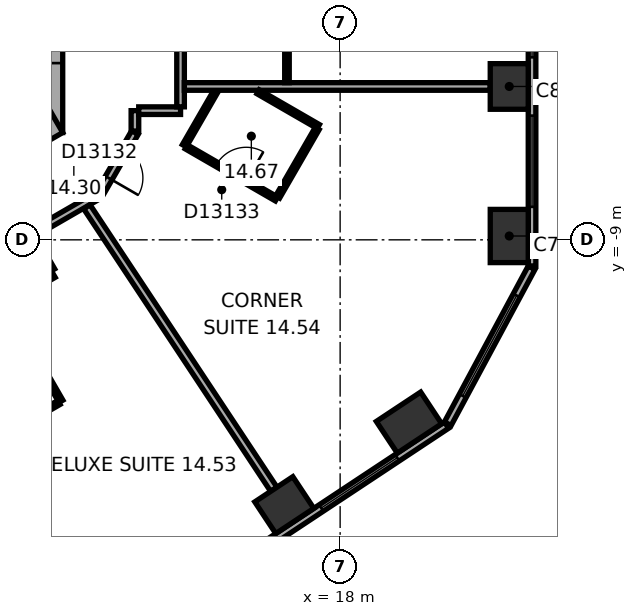
"""IFC4 building model, lengths in metres.
Left out: names, types, materials, properties, quantities, classifications, styles, units other than length and angle.
Written with IfcOpenShell. Run it as: python <this file> out.ifc"""

import sys

from ifc_helpers import new_model, si_unit, direction, frame, frame_2d, origin, origin_2d, place, context, subcontext, project, spatial, rectangle, extrude, element, fill, save


model = new_model("IFC4")
c1 = context("Model", 3, precision=1e-05, world=origin(), true_north=direction((0.0, 1.0)))
c2 = subcontext(c1, "Body", "Model", "MODEL_VIEW")
j1 = project(units=[si_unit("LENGTHUNIT", "METRE"), si_unit("PLANEANGLEUNIT", "RADIAN")], contexts=[c1])
p1 = place(None, origin())
s1 = spatial("IfcSite", under=j1, at=p1, CompositionType="ELEMENT")
p2 = place(p1, origin())
s2 = spatial("IfcBuilding", under=s1, at=p2, CompositionType="ELEMENT")
p3 = place(p2, frame((0.0, 0.0, 67.1)))
s3 = spatial("IfcBuildingStorey", under=s2, at=p3, CompositionType="ELEMENT", Elevation=67.1)
p4 = place(p3, frame((22.45, -8.899, 0.0), z_axis=(0.0, 0.0, 1.0), x_axis=(0.0, 1.0, 0.0)))
e1 = element("IfcColumn", 1, at=p4, inside=s3, PredefinedType="COLUMN", context=c2, shape_type="SweptSolid", body=[
    extrude(rectangle(XDim=1.4, YDim=1.0, at=origin_2d()), origin(), (0.0, 0.0, 1.0), 3.3),
])
for number, where, z_axis, x_axis in (
    (2, (22.45, -4.965, 0.0), (0.0, 0.0, 1.0), (0.0, 1.0, 0.0)),
    (3, (16.531, -15.981, 0.0), (0.0, 0.0, 1.0), (0.834, 0.552, 0.0)),
):
    element("IfcColumn", number, at=place(p3, frame(where, z_axis=z_axis, x_axis=x_axis)), inside=s3, PredefinedType="COLUMN", context=c2, shape_type="SweptSolid", body=[
        extrude(rectangle(XDim=1.2, YDim=1.0, at=origin_2d()), origin(), (0.0, 0.0, 1.0), 3.3),
    ])
p5 = place(p3, frame((19.812, -13.809, 0.0), z_axis=(0.0, 0.0, 1.0), x_axis=(0.833885822067, 0.551936985312, 0.0)))
e4 = element("IfcColumn", 4, at=p5, inside=s3, PredefinedType="COLUMN", context=c2, shape_type="SweptSolid", body=[
    extrude(rectangle(XDim=1.4, YDim=1.0, at=origin_2d()), origin(), (0.0, 0.0, 1.0), 3.3),
])
p6 = place(p3, frame((10.1, -6.177, 0.0), z_axis=(0.0, 0.0, 1.0), x_axis=(0.0, 1.0, 0.0)))
e5 = element("IfcWall", 5, at=p6, inside=s3, PredefinedType="SHEAR", context=c2, shape_type="SweptSolid", body=[
    extrude(rectangle(XDim=12.355, YDim=1.2, at=frame_2d((6.177, 0.0))), origin(), (0.0, 0.0, 1.0), 3.3),
])
p7 = place(p6, frame((6.378, 0.0, 0.0)))
e6 = element("IfcOpeningElement", 6, at=p7, cuts=e5, PredefinedType="OPENING", context=c2, shape_type="SweptSolid", body=[
    extrude(rectangle(XDim=1.5, YDim=2.1, at=frame_2d((0.75, 1.05))), frame((0.0, 0.61, 0.0), z_axis=(0.0, -1.0, 0.0), x_axis=(1.0, 0.0, 0.0)), (0.0, 0.0, 1.0), 1.22),
])
p8 = place(p6, frame((1.828, 0.0, 0.0)))
e7 = element("IfcOpeningElement", 7, at=p8, cuts=e5, PredefinedType="OPENING", context=c2, shape_type="SweptSolid", body=[
    extrude(rectangle(XDim=1.1, YDim=2.1, at=frame_2d((0.55, 1.05))), frame((0.0, 0.61, 0.0), z_axis=(0.0, -1.0, 0.0), x_axis=(1.0, 0.0, 0.0)), (0.0, 0.0, 1.0), 1.22),
])
p9 = place(p6, frame((4.427, 0.0, 0.0)))
e8 = element("IfcOpeningElement", 8, at=p9, cuts=e5, PredefinedType="OPENING", context=c2, shape_type="SweptSolid", body=[
    extrude(rectangle(XDim=1.1, YDim=2.1, at=frame_2d((0.55, 1.05))), frame((0.0, 0.61, 0.0), z_axis=(0.0, -1.0, 0.0), x_axis=(1.0, 0.0, 0.0)), (0.0, 0.0, 1.0), 1.22),
])
p10 = place(p3, frame((-0.3, -11.836, 0.0), z_axis=(0.0, 0.0, 1.0), x_axis=(0.866021384402, 0.500006961711, 0.0)))
e9 = element("IfcWall", 9, at=p10, inside=s3, PredefinedType="SHEAR", context=c2, shape_type="SweptSolid", body=[
    extrude(rectangle(XDim=12.355, YDim=1.2, at=frame_2d((6.178, 0.0))), origin(), (0.0, 0.0, 1.0), 3.3),
])
p11 = place(p10, frame((4.128, 0.0, 0.0)))
e10 = element("IfcOpeningElement", 10, at=p11, cuts=e9, PredefinedType="OPENING", context=c2, shape_type="SweptSolid", body=[
    extrude(rectangle(XDim=0.9, YDim=2.1, at=frame_2d((0.45, 1.05))), frame((0.0, 0.61, 0.0), z_axis=(0.0, -1.0, 0.0), x_axis=(1.0, 0.0, 0.0)), (0.0, 0.0, 1.0), 1.22),
])
p12 = place(p10, frame((7.928, 0.0, 0.0)))
e11 = element("IfcOpeningElement", 11, at=p12, cuts=e9, PredefinedType="OPENING", context=c2, shape_type="SweptSolid", body=[
    extrude(rectangle(XDim=1.1, YDim=2.1, at=frame_2d((0.55, 1.05))), frame((0.0, 0.61, 0.0), z_axis=(0.0, -1.0, 0.0), x_axis=(1.0, 0.0, 0.0)), (0.0, 0.0, 1.0), 1.22),
])
p13 = place(p3, frame((23.05, -9.687, 0.0), z_axis=(0.0, 0.0, 1.0), x_axis=(0.0, 1.0, 0.0)))
e12 = element("IfcWall", 12, at=p13, inside=s3, PredefinedType="STANDARD", context=c2, shape_type="SweptSolid", body=[
    extrude(rectangle(XDim=21.246, YDim=0.2, at=frame_2d((10.623, 0.0))), origin(), (0.0, 0.0, 1.0), 3.3),
])
p14 = place(p13, frame((1.555, 0.0, 0.8)))
e13 = element("IfcOpeningElement", 13, at=p14, cuts=e12, PredefinedType="OPENING", context=c2, shape_type="SweptSolid", body=[
    extrude(rectangle(XDim=2.4, YDim=1.7, at=frame_2d((1.2, 0.85))), frame((0.0, 0.11, 0.0), z_axis=(0.0, -1.0, 0.0), x_axis=(1.0, 0.0, 0.0)), (0.0, 0.0, 1.0), 0.22),
])
p15 = place(p13, frame((5.489, 0.0, 0.8)))
e14 = element("IfcOpeningElement", 14, at=p15, cuts=e12, PredefinedType="OPENING", context=c2, shape_type="SweptSolid", body=[
    extrude(rectangle(XDim=2.4, YDim=1.7, at=frame_2d((1.2, 0.85))), frame((0.0, 0.11, 0.0), z_axis=(0.0, -1.0, 0.0), x_axis=(1.0, 0.0, 0.0)), (0.0, 0.0, 1.0), 0.22),
])
p16 = place(p13, frame((9.424, 0.0, 0.8)))
e15 = element("IfcOpeningElement", 15, at=p16, cuts=e12, PredefinedType="OPENING", context=c2, shape_type="SweptSolid", body=[
    extrude(rectangle(XDim=2.4, YDim=1.7, at=frame_2d((1.2, 0.85))), frame((0.0, 0.11, 0.0), z_axis=(0.0, -1.0, 0.0), x_axis=(1.0, 0.0, 0.0)), (0.0, 0.0, 1.0), 0.22),
])
p17 = place(p13, frame((13.358, 0.0, 0.8)))
e16 = element("IfcOpeningElement", 16, at=p17, cuts=e12, PredefinedType="OPENING", context=c2, shape_type="SweptSolid", body=[
    extrude(rectangle(XDim=2.4, YDim=1.7, at=frame_2d((1.2, 0.85))), frame((0.0, 0.11, 0.0), z_axis=(0.0, -1.0, 0.0), x_axis=(1.0, 0.0, 0.0)), (0.0, 0.0, 1.0), 0.22),
])
p18 = place(p13, frame((17.293, 0.0, 0.8)))
e17 = element("IfcOpeningElement", 17, at=p18, cuts=e12, PredefinedType="OPENING", context=c2, shape_type="SweptSolid", body=[
    extrude(rectangle(XDim=2.4, YDim=1.7, at=frame_2d((1.2, 0.85))), frame((0.0, 0.11, 0.0), z_axis=(0.0, -1.0, 0.0), x_axis=(1.0, 0.0, 0.0)), (0.0, 0.0, 1.0), 0.22),
])
p19 = place(p3, frame((3.083, -25.601, 0.0), z_axis=(0.0, 0.0, 1.0), x_axis=(0.833884295743, 0.551939291329, 0.0)))
e18 = element("IfcWall", 18, at=p19, inside=s3, PredefinedType="STANDARD", context=c2, shape_type="SweptSolid", body=[
    extrude(rectangle(XDim=21.246, YDim=0.2, at=frame_2d((10.623, 0.0))), origin(), (0.0, 0.0, 1.0), 3.3),
])
p20 = place(p19, frame((1.553, 0.0, 0.8)))
e19 = element("IfcOpeningElement", 19, at=p20, cuts=e18, PredefinedType="OPENING", context=c2, shape_type="SweptSolid", body=[
    extrude(rectangle(XDim=2.4, YDim=1.7, at=frame_2d((1.2, 0.85))), frame((0.0, 0.11, 0.0), z_axis=(0.0, -1.0, 0.0), x_axis=(1.0, 0.0, 0.0)), (0.0, 0.0, 1.0), 0.22),
])
p21 = place(p19, frame((5.488, 0.0, 0.8)))
e20 = element("IfcOpeningElement", 20, at=p21, cuts=e18, PredefinedType="OPENING", context=c2, shape_type="SweptSolid", body=[
    extrude(rectangle(XDim=2.4, YDim=1.7, at=frame_2d((1.2, 0.85))), frame((0.0, 0.11, 0.0), z_axis=(0.0, -1.0, 0.0), x_axis=(1.0, 0.0, 0.0)), (0.0, 0.0, 1.0), 0.22),
])
p22 = place(p19, frame((9.422, 0.0, 0.8)))
e21 = element("IfcOpeningElement", 21, at=p22, cuts=e18, PredefinedType="OPENING", context=c2, shape_type="SweptSolid", body=[
    extrude(rectangle(XDim=2.4, YDim=1.7, at=frame_2d((1.2, 0.85))), frame((0.0, 0.11, 0.0), z_axis=(0.0, -1.0, 0.0), x_axis=(1.0, 0.0, 0.0)), (0.0, 0.0, 1.0), 0.22),
])
p23 = place(p19, frame((13.357, 0.0, 0.8)))
e22 = element("IfcOpeningElement", 22, at=p23, cuts=e18, PredefinedType="OPENING", context=c2, shape_type="SweptSolid", body=[
    extrude(rectangle(XDim=2.4, YDim=1.7, at=frame_2d((1.2, 0.85))), frame((0.0, 0.11, 0.0), z_axis=(0.0, -1.0, 0.0), x_axis=(1.0, 0.0, 0.0)), (0.0, 0.0, 1.0), 0.22),
])
p24 = place(p19, frame((17.291, 0.0, 0.8)))
e23 = element("IfcOpeningElement", 23, at=p24, cuts=e18, PredefinedType="OPENING", context=c2, shape_type="SweptSolid", body=[
    extrude(rectangle(XDim=2.4, YDim=1.7, at=frame_2d((1.2, 0.85))), frame((0.0, 0.11, 0.0), z_axis=(0.0, -1.0, 0.0), x_axis=(1.0, 0.0, 0.0)), (0.0, 0.0, 1.0), 0.22),
])
p25 = place(p3, frame((20.833, -13.839, 0.0), z_axis=(0.0, 0.0, 1.0), x_axis=(0.473321668581, 0.880889662813, 0.0)))
e24 = element("IfcWall", 24, at=p25, inside=s3, PredefinedType="STANDARD", context=c2, shape_type="SweptSolid", body=[
    extrude(rectangle(XDim=4.66, YDim=0.2, at=frame_2d((2.33, 0.0))), origin(), (0.0, 0.0, 1.0), 3.3),
])
p26 = place(p25, frame((0.83, 0.0, 0.8)))
e25 = element("IfcOpeningElement", 25, at=p26, cuts=e24, PredefinedType="OPENING", context=c2, shape_type="SweptSolid", body=[
    extrude(rectangle(XDim=3.0, YDim=1.7, at=frame_2d((1.5, 0.85))), frame((0.0, 0.11, 0.0), z_axis=(0.0, -1.0, 0.0), x_axis=(1.0, 0.0, 0.0)), (0.0, 0.0, 1.0), 0.22),
])
p27 = place(p3, frame((7.385, -11.673, 0.0), z_axis=(0.0, 0.0, 1.0), x_axis=(0.866037524642, 0.499979005472, 0.0)))
e26 = element("IfcWall", 26, at=p27, inside=s3, PredefinedType="PARTITIONING", context=c2, shape_type="SweptSolid", body=[
    extrude(rectangle(XDim=3.542, YDim=0.2, at=frame_2d((1.771, 0.0))), origin(), (0.0, 0.0, 1.0), 3.05),
])
p28 = place(p3, frame((9.203, -10.738, 0.0), z_axis=(0.0, 0.0, 1.0), x_axis=(0.50005036918, -0.865996321171, 0.0)))
e27 = element("IfcWall", 27, at=p28, inside=s3, PredefinedType="PARTITIONING", context=c2, shape_type="SweptSolid", body=[
    extrude(rectangle(XDim=2.9, YDim=0.12, at=frame_2d((1.45, 0.0))), origin(), (0.0, 0.0, 1.0), 3.05),
])
p29 = place(p3, frame((9.852, -8.861, 0.0), z_axis=(0.0, 0.0, 1.0), x_axis=(0.866013291437, 0.500020978615, 0.0)))
e28 = element("IfcWall", 28, at=p29, inside=s3, PredefinedType="PARTITIONING", context=c2, shape_type="SweptSolid", body=[
    extrude(rectangle(XDim=2.077, YDim=0.2, at=frame_2d((1.038, 0.0))), origin(), (0.0, 0.0, 1.0), 3.05),
])
p30 = place(p3, frame((10.402, -9.815, 0.0), z_axis=(0.0, 0.0, 1.0), x_axis=(-0.499968756647, 0.866043441391, 0.0)))
e29 = element("IfcWall", 29, at=p30, inside=s3, PredefinedType="PARTITIONING", context=c2, shape_type="SweptSolid", body=[
    extrude(rectangle(XDim=1.001, YDim=0.2, at=frame_2d((0.5, 0.0))), origin(), (0.0, 0.0, 1.0), 3.05),
])
p31 = place(p3, frame((10.601, -13.28, 0.0), z_axis=(0.0, 0.0, 1.0), x_axis=(-0.866044057189, -0.499967689963, 0.0)))
e30 = element("IfcWall", 30, at=p31, inside=s3, PredefinedType="PARTITIONING", context=c2, shape_type="SweptSolid", body=[
    extrude(rectangle(XDim=1.982, YDim=0.12, at=frame_2d((0.991, 0.0))), origin(), (0.0, 0.0, 1.0), 3.05),
])
p32 = place(p3, frame((11.67, -7.788, 0.0), z_axis=(0.0, 0.0, 1.0), x_axis=(0.500063286585, 0.865988862174, 0.0)))
e31 = element("IfcWall", 31, at=p32, inside=s3, PredefinedType="PARTITIONING", context=c2, shape_type="SweptSolid", body=[
    extrude(rectangle(XDim=1.86, YDim=0.2, at=frame_2d((0.93, 0.0))), origin(), (0.0, 0.0, 1.0), 3.05),
])
p33 = place(p32, frame((0.48, 0.0, 0.0)))
e32 = element("IfcOpeningElement", 32, at=p33, cuts=e31, PredefinedType="OPENING", context=c2, shape_type="SweptSolid", body=[
    extrude(rectangle(XDim=0.9, YDim=2.1, at=frame_2d((0.45, 1.05))), frame((0.0, 0.11, 0.0), z_axis=(0.0, -1.0, 0.0), x_axis=(1.0, 0.0, 0.0)), (0.0, 0.0, 1.0), 0.22),
])
p34 = place(p3, frame((12.6, -6.138, 0.0), z_axis=(0.0, 0.0, 1.0), x_axis=(0.0, 1.0, 0.0)))
e33 = element("IfcWall", 33, at=p34, inside=s3, PredefinedType="PARTITIONING", context=c2, shape_type="SweptSolid", body=[
    extrude(rectangle(XDim=0.537, YDim=0.2, at=frame_2d((0.268, 0.0))), origin(), (0.0, 0.0, 1.0), 3.05),
])
p35 = place(p3, frame((12.7, -5.601, 0.0), z_axis=(0.0, 0.0, 1.0), x_axis=(1.0, 0.0, 0.0)))
e34 = element("IfcWall", 34, at=p35, inside=s3, PredefinedType="PARTITIONING", context=c2, shape_type="SweptSolid", body=[
    extrude(rectangle(XDim=1.101, YDim=0.2, at=frame_2d((0.551, 0.0))), origin(), (0.0, 0.0, 1.0), 3.05),
])
p36 = place(p3, frame((13.801, -5.501, 0.0), z_axis=(0.0, 0.0, 1.0), x_axis=(0.0, 1.0, 0.0)))
e35 = element("IfcWall", 35, at=p36, inside=s3, PredefinedType="PARTITIONING", context=c2, shape_type="SweptSolid", body=[
    extrude(rectangle(XDim=5.702, YDim=0.2, at=frame_2d((2.851, 0.0))), origin(), (0.0, 0.0, 1.0), 3.05),
])
p37 = place(p3, frame((13.901, -6.524, 0.0), z_axis=(0.0, 0.0, 1.0), x_axis=(0.499964162598, 0.86604609353, 0.0)))
e36 = element("IfcWall", 36, at=p37, inside=s3, PredefinedType="PARTITIONING", context=c2, shape_type="SweptSolid", body=[
    extrude(rectangle(XDim=1.661, YDim=0.12, at=frame_2d((0.831, 0.0))), origin(), (0.0, 0.0, 1.0), 3.05),
])
p38 = place(p3, frame((13.901, -4.965, 0.0), z_axis=(0.0, 0.0, 1.0), x_axis=(1.0, 0.0, 0.0)))
e37 = element("IfcWall", 37, at=p38, inside=s3, PredefinedType="PARTITIONING", context=c2, shape_type="SweptSolid", body=[
    extrude(rectangle(XDim=8.049, YDim=0.2, at=frame_2d((4.024, 0.0))), origin(), (0.0, 0.0, 1.0), 3.05),
])
p39 = place(p3, frame((15.841, -5.104, 0.0), z_axis=(0.0, 0.0, 1.0), x_axis=(0.866025591402, -0.499999675036, 0.0)))
e38 = element("IfcWall", 38, at=p39, inside=s3, PredefinedType="PARTITIONING", context=c2, shape_type="SweptSolid", body=[
    extrude(rectangle(XDim=1.83, YDim=0.12, at=frame_2d((0.915, 0.0))), origin(), (0.0, 0.0, 1.0), 3.05),
])
p40 = place(p3, frame((16.255, -15.564, 0.0), z_axis=(0.0, 0.0, 1.0), x_axis=(-0.55192208744, 0.833895682562, 0.0)))
e39 = element("IfcWall", 39, at=p40, inside=s3, PredefinedType="PARTITIONING", context=c2, shape_type="SweptSolid", body=[
    extrude(rectangle(XDim=8.913, YDim=0.2, at=frame_2d((4.457, 0.0))), origin(), (0.0, 0.0, 1.0), 2.6),
])
p41 = place(p3, frame((16.326, -7.925, 0.0), z_axis=(0.0, 0.0, 1.0), x_axis=(-0.865997131366, 0.500048966069, 0.0)))
e40 = element("IfcWall", 40, at=p41, inside=s3, PredefinedType="PARTITIONING", context=c2, shape_type="SweptSolid", body=[
    extrude(rectangle(XDim=2.74, YDim=0.12, at=frame_2d((1.37, 0.0))), origin(), (0.0, 0.0, 1.0), 3.05),
])
p42 = place(p41, frame((0.92, 0.0, 0.0)))
e41 = element("IfcOpeningElement", 41, at=p42, cuts=e40, PredefinedType="OPENING", context=c2, shape_type="SweptSolid", body=[
    extrude(rectangle(XDim=0.9, YDim=2.1, at=frame_2d((0.45, 1.05))), frame((0.0, 0.07, 0.0), z_axis=(0.0, -1.0, 0.0), x_axis=(1.0, 0.0, 0.0)), (0.0, 0.0, 1.0), 0.14),
])
p43 = place(p3, frame((16.601, -2.425, 0.0), z_axis=(0.0, 0.0, 1.0), x_axis=(0.0, -1.0, 0.0)))
e42 = element("IfcWall", 42, at=p43, inside=s3, PredefinedType="PARTITIONING", context=c2, shape_type="SweptSolid", body=[
    extrude(rectangle(XDim=2.44, YDim=0.12, at=frame_2d((1.22, 0.0))), origin(), (0.0, 0.0, 1.0), 3.05),
])
p44 = place(p3, frame((17.396, -6.071, 0.0), z_axis=(0.0, 0.0, 1.0), x_axis=(-0.500027264788, -0.866009661879, 0.0)))
e43 = element("IfcWall", 43, at=p44, inside=s3, PredefinedType="PARTITIONING", context=c2, shape_type="SweptSolid", body=[
    extrude(rectangle(XDim=2.08, YDim=0.12, at=frame_2d((1.04, 0.0))), origin(), (0.0, 0.0, 1.0), 3.05),
])
p45 = place(p14, origin())
e44 = element("IfcWindow", 44, at=p45, inside=s3, PartitioningType="SINGLE_PANEL", PredefinedType="WINDOW", context=c2, shape_type="SweptSolid", body=[
    extrude(rectangle(XDim=2.4, YDim=1.7, at=frame_2d((1.2, 0.85))), frame((0.0, 0.03, 0.0), z_axis=(0.0, -1.0, 0.0), x_axis=(1.0, 0.0, 0.0)), (0.0, 0.0, 1.0), 0.06),
])
fill(e13, e44)
p46 = place(p15, origin())
e45 = element("IfcWindow", 45, at=p46, inside=s3, PartitioningType="SINGLE_PANEL", PredefinedType="WINDOW", context=c2, shape_type="SweptSolid", body=[
    extrude(rectangle(XDim=2.4, YDim=1.7, at=frame_2d((1.2, 0.85))), frame((0.0, 0.03, 0.0), z_axis=(0.0, -1.0, 0.0), x_axis=(1.0, 0.0, 0.0)), (0.0, 0.0, 1.0), 0.06),
])
fill(e14, e45)
p47 = place(p24, origin())
e46 = element("IfcWindow", 46, at=p47, inside=s3, PartitioningType="SINGLE_PANEL", PredefinedType="WINDOW", context=c2, shape_type="SweptSolid", body=[
    extrude(rectangle(XDim=2.4, YDim=1.7, at=frame_2d((1.2, 0.85))), frame((0.0, 0.03, 0.0), z_axis=(0.0, -1.0, 0.0), x_axis=(1.0, 0.0, 0.0)), (0.0, 0.0, 1.0), 0.06),
])
fill(e23, e46)
p48 = place(p26, origin())
e47 = element("IfcWindow", 47, at=p48, inside=s3, PartitioningType="SINGLE_PANEL", PredefinedType="WINDOW", context=c2, shape_type="SweptSolid", body=[
    extrude(rectangle(XDim=3.0, YDim=1.7, at=frame_2d((1.5, 0.85))), frame((0.0, 0.03, 0.0), z_axis=(0.0, -1.0, 0.0), x_axis=(1.0, 0.0, 0.0)), (0.0, 0.0, 1.0), 0.06),
])
fill(e25, e47)
p49 = place(p33, origin())
e48 = element("IfcDoor", 48, at=p49, inside=s3, OperationType="SINGLE_SWING_LEFT", PredefinedType="DOOR", context=c2, shape_type="SweptSolid", body=[
    extrude(rectangle(XDim=0.9, YDim=2.1, at=frame_2d((0.45, 1.05))), frame((0.0, 0.025, 0.0), z_axis=(0.0, -1.0, 0.0), x_axis=(1.0, 0.0, 0.0)), (0.0, 0.0, 1.0), 0.05),
])
fill(e32, e48)
p50 = place(p42, origin())
e49 = element("IfcDoor", 49, at=p50, inside=s3, OperationType="SINGLE_SWING_LEFT", PredefinedType="DOOR", context=c2, shape_type="SweptSolid", body=[
    extrude(rectangle(XDim=0.9, YDim=2.1, at=frame_2d((0.45, 1.05))), frame((0.0, 0.025, 0.0), z_axis=(0.0, -1.0, 0.0), x_axis=(1.0, 0.0, 0.0)), (0.0, 0.0, 1.0), 0.05),
])
fill(e41, e49)
save(model, sys.argv[1])
